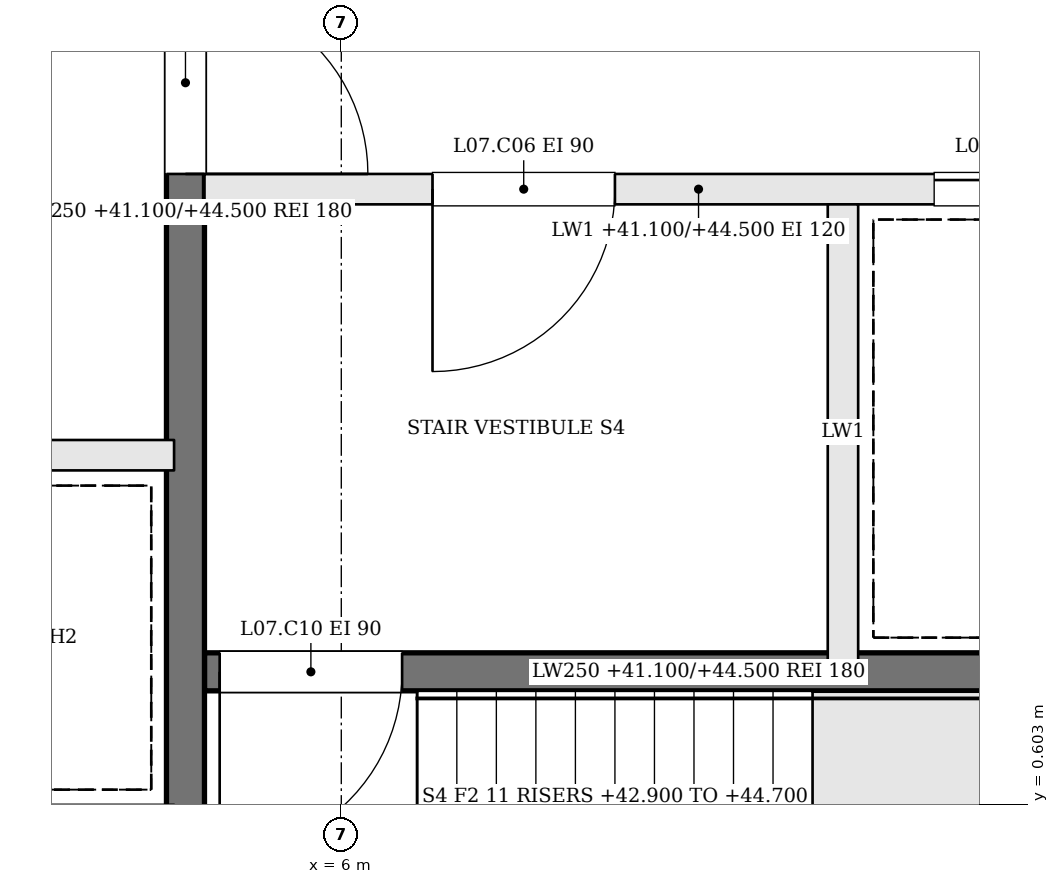
"""IFC4 building model, lengths in metres.
Left out: names, types, materials, properties, quantities, classifications, styles, units other than length and angle.
Written with IfcOpenShell. Run it as: python <this file> out.ifc"""

import sys

from ifc_helpers import new_model, si_unit, direction, frame, frame_2d, origin, place, context, subcontext, project, spatial, rectangle, extrude, element, fill, save


model = new_model("IFC4")
c1 = context("Model", 3, precision=1e-05, world=origin(), true_north=direction((0.0, 1.0)))
c2 = subcontext(c1, "Body", "Model", "MODEL_VIEW")
j1 = project(units=[si_unit("LENGTHUNIT", "METRE"), si_unit("PLANEANGLEUNIT", "RADIAN")], contexts=[c1])
p1 = place(None, origin())
s1 = spatial("IfcSite", under=j1, at=p1, CompositionType="ELEMENT")
p2 = place(p1, origin())
s2 = spatial("IfcBuilding", under=s1, at=p2, CompositionType="ELEMENT")
p3 = place(p2, frame((0.0, 0.0, 41.1)))
s3 = spatial("IfcBuildingStorey", under=s2, at=p3, CompositionType="ELEMENT", Elevation=41.1)
p4 = place(p3, frame((11.6, 4.65, 0.0), z_axis=(0.0, 0.0, 1.0), x_axis=(-1.0, 0.0, 0.0)))
e1 = element("IfcWall", 1, at=p4, inside=s3, PredefinedType="SOLIDWALL", context=c2, shape_type="SweptSolid", body=[
    extrude(rectangle(XDim=6.5, YDim=0.2, at=frame_2d((3.25, 0.0))), origin(), (0.0, 0.0, 1.0), 3.4),
])
p5 = place(p4, frame((3.8, 0.0, 0.0)))
e2 = element("IfcOpeningElement", 2, at=p5, cuts=e1, PredefinedType="OPENING", context=c2, shape_type="SweptSolid", body=[
    extrude(rectangle(XDim=1.2, YDim=2.1, at=frame_2d((0.6, 1.05))), frame((0.0, 0.11, 0.0), z_axis=(0.0, -1.0, 0.0), x_axis=(1.0, 0.0, 0.0)), (0.0, 0.0, 1.0), 0.22),
])
p6 = place(p4, frame((0.5, 0.0, 0.0)))
e3 = element("IfcOpeningElement", 3, at=p6, cuts=e1, PredefinedType="OPENING", context=c2, shape_type="SweptSolid", body=[
    extrude(rectangle(XDim=1.2, YDim=2.1, at=frame_2d((0.6, 1.05))), frame((0.0, 0.11, 0.0), z_axis=(0.0, -1.0, 0.0), x_axis=(1.0, 0.0, 0.0)), (0.0, 0.0, 1.0), 0.22),
])
p7 = place(p3, frame((11.6, 1.475, 0.0), z_axis=(0.0, 0.0, 1.0), x_axis=(-1.0, 0.0, 0.0)))
e4 = element("IfcWall", 4, at=p7, inside=s3, PredefinedType="SOLIDWALL", context=c2, shape_type="SweptSolid", body=[
    extrude(rectangle(XDim=6.5, YDim=0.25, at=frame_2d((3.25, 0.0))), origin(), (0.0, 0.0, 1.0), 3.4),
])
p8 = place(p7, frame((5.2, 0.0, 0.0)))
e5 = element("IfcOpeningElement", 5, at=p8, cuts=e4, PredefinedType="OPENING", context=c2, shape_type="SweptSolid", body=[
    extrude(rectangle(XDim=1.2, YDim=2.1, at=frame_2d((0.6, 1.05))), frame((0.0, 0.135, 0.0), z_axis=(0.0, -1.0, 0.0), x_axis=(1.0, 0.0, 0.0)), (0.0, 0.0, 1.0), 0.27),
])
p9 = place(p3, frame((9.3, 4.55, 0.0), z_axis=(0.0, 0.0, 1.0), x_axis=(0.0, -1.0, 0.0)))
e6 = element("IfcWall", 6, at=p9, inside=s3, PredefinedType="SOLIDWALL", context=c2, shape_type="SweptSolid", body=[
    extrude(rectangle(XDim=3.0, YDim=0.2, at=frame_2d((1.5, 0.0))), origin(), (0.0, 0.0, 1.0), 3.4),
])
p10 = place(p3, frame((4.975, 10.6, 0.0), z_axis=(0.0, 0.0, 1.0), x_axis=(0.0, -1.0, 0.0)))
e7 = element("IfcWall", 7, at=p10, inside=s3, PredefinedType="SOLIDWALL", context=c2, shape_type="SweptSolid", body=[
    extrude(rectangle(XDim=12.2, YDim=0.25, at=frame_2d((6.1, 0.0))), origin(), (0.0, 0.0, 1.0), 3.4),
])
p11 = place(p10, frame((4.65, 0.0, 0.0)))
e8 = element("IfcOpeningElement", 8, at=p11, cuts=e7, PredefinedType="OPENING", context=c2, shape_type="SweptSolid", body=[
    extrude(rectangle(XDim=1.2, YDim=2.1, at=frame_2d((0.6, 1.05))), frame((0.0, 0.135, 0.0), z_axis=(0.0, -1.0, 0.0), x_axis=(1.0, 0.0, 0.0)), (0.0, 0.0, 1.0), 0.27),
])
p12 = place(p3, frame((-4.9, 2.9, 0.0), z_axis=(0.0, 0.0, 1.0), x_axis=(1.0, 0.0, 0.0)))
e9 = element("IfcWall", 9, at=p12, inside=s3, PredefinedType="SOLIDWALL", context=c2, shape_type="SweptSolid", body=[
    extrude(rectangle(XDim=9.8, YDim=0.2, at=frame_2d((4.9, 0.0))), origin(), (0.0, 0.0, 1.0), 3.4),
])
p13 = place(p12, frame((0.675, 0.0, 0.0)))
e10 = element("IfcOpeningElement", 10, at=p13, cuts=e9, PredefinedType="OPENING", context=c2, shape_type="SweptSolid", body=[
    extrude(rectangle(XDim=1.1, YDim=2.1, at=frame_2d((0.55, 1.05))), frame((0.0, 0.11, 0.0), z_axis=(0.0, -1.0, 0.0), x_axis=(1.0, 0.0, 0.0)), (0.0, 0.0, 1.0), 0.22),
])
p14 = place(p12, frame((3.125, 0.0, 0.0)))
e11 = element("IfcOpeningElement", 11, at=p14, cuts=e9, PredefinedType="OPENING", context=c2, shape_type="SweptSolid", body=[
    extrude(rectangle(XDim=1.1, YDim=2.1, at=frame_2d((0.55, 1.05))), frame((0.0, 0.11, 0.0), z_axis=(0.0, -1.0, 0.0), x_axis=(1.0, 0.0, 0.0)), (0.0, 0.0, 1.0), 0.22),
])
p15 = place(p11, origin())
e12 = element("IfcDoor", 12, at=p15, inside=s3, OperationType="SINGLE_SWING_RIGHT", PredefinedType="DOOR", context=c2, shape_type="SweptSolid", body=[
    extrude(rectangle(XDim=1.2, YDim=2.1, at=frame_2d((0.6, 1.05))), frame((0.0, 0.025, 0.0), z_axis=(0.0, -1.0, 0.0), x_axis=(1.0, 0.0, 0.0)), (0.0, 0.0, 1.0), 0.05),
])
fill(e8, e12)
p16 = place(p5, origin())
e13 = element("IfcDoor", 13, at=p16, inside=s3, OperationType="SINGLE_SWING_RIGHT", PredefinedType="DOOR", context=c2, shape_type="SweptSolid", body=[
    extrude(rectangle(XDim=1.2, YDim=2.1, at=frame_2d((0.6, 1.05))), frame((0.0, 0.025, 0.0), z_axis=(0.0, -1.0, 0.0), x_axis=(1.0, 0.0, 0.0)), (0.0, 0.0, 1.0), 0.05),
])
fill(e2, e13)
p17 = place(p8, origin())
e14 = element("IfcDoor", 14, at=p17, inside=s3, OperationType="SINGLE_SWING_RIGHT", PredefinedType="DOOR", context=c2, shape_type="SweptSolid", body=[
    extrude(rectangle(XDim=1.2, YDim=2.1, at=frame_2d((0.6, 1.05))), frame((0.0, 0.025, 0.0), z_axis=(0.0, -1.0, 0.0), x_axis=(1.0, 0.0, 0.0)), (0.0, 0.0, 1.0), 0.05),
])
fill(e5, e14)
p18 = place(p6, origin())
e15 = element("IfcDoor", 15, at=p18, inside=s3, OperationType="SLIDING_TO_RIGHT", PredefinedType="DOOR", context=c2, shape_type="SweptSolid", body=[
    extrude(rectangle(XDim=1.2, YDim=2.1, at=frame_2d((0.6, 1.05))), frame((0.0, 0.025, 0.0), z_axis=(0.0, -1.0, 0.0), x_axis=(1.0, 0.0, 0.0)), (0.0, 0.0, 1.0), 0.05),
])
fill(e3, e15)
save(model, sys.argv[1])
